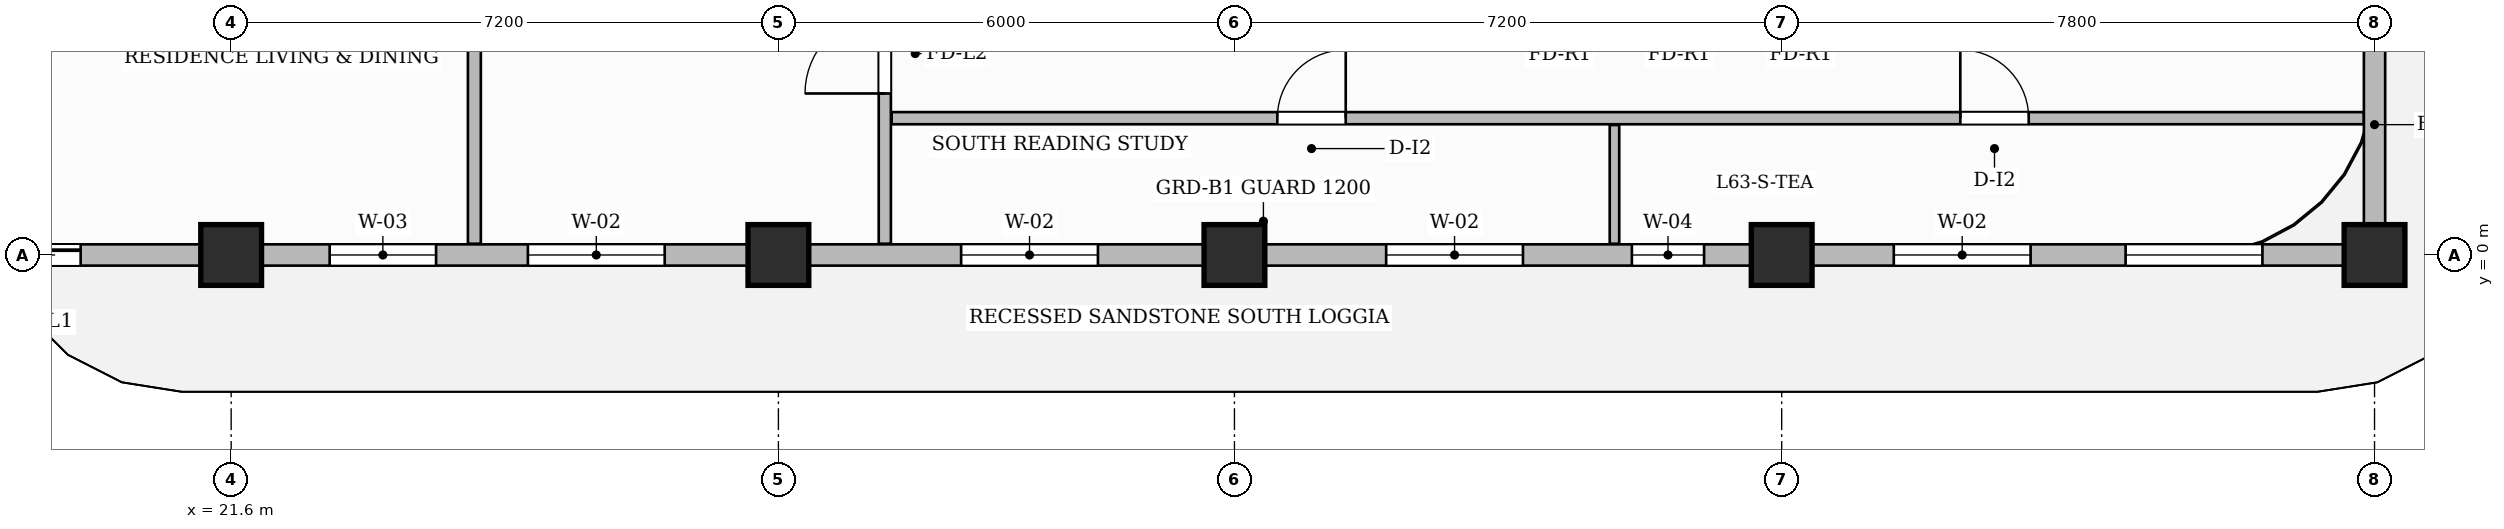
"""IFC4 building model, lengths in metres.
Left out: names, types, materials, properties, quantities, classifications, styles, units other than length and angle.
Written with IfcOpenShell. Run it as: python <this file> out.ifc"""

import sys

from ifc_helpers import new_model, si_unit, direction, frame, frame_2d, origin, origin_2d, place, context, subcontext, project, spatial, rectangle, extrude, source, transform, mapped, element, fill, save


model = new_model("IFC4")
c1 = context("Model", 3, precision=1e-05, world=origin(), true_north=direction((0.0, 1.0)))
c2 = subcontext(c1, "Body", "Model", "MODEL_VIEW")
j1 = project(units=[si_unit("LENGTHUNIT", "METRE"), si_unit("PLANEANGLEUNIT", "RADIAN")], contexts=[c1])
p1 = place(None, origin())
s1 = spatial("IfcSite", under=j1, at=p1, CompositionType="ELEMENT")
p2 = place(p1, origin())
s2 = spatial("IfcBuilding", under=s1, at=p2, CompositionType="ELEMENT")
p3 = place(p2, frame((0.0, 0.0, 251.95)))
s3 = spatial("IfcBuildingStorey", under=s2, at=p3, CompositionType="ELEMENT", Elevation=251.95)
m1 = source(origin(), c2, "Body", "SweptSolid", [
    extrude(rectangle(XDim=0.8, YDim=0.8, at=origin_2d()), origin(), (0.0, 0.0, 1.0), 3.85),
])
for number, where, z_axis, x_axis in (
    (1, (21.6, 0.0, 0.0), (0.0, 0.0, 1.0), (1.0, 0.0, 0.0)),
    (2, (28.8, 0.0, 0.0), (0.0, 0.0, 1.0), (1.0, 0.0, 0.0)),
    (3, (34.8, 0.0, 0.0), (0.0, 0.0, 1.0), (1.0, 0.0, 0.0)),
    (4, (42.0, 0.0, 0.0), (0.0, 0.0, 1.0), (1.0, 0.0, 0.0)),
    (5, (49.8, 0.0, 0.0), (0.0, 0.0, 1.0), (1.0, 0.0, 0.0)),
):
    element("IfcColumn", number, at=place(p3, frame(where, z_axis=z_axis, x_axis=x_axis)), inside=s3, PredefinedType="COLUMN", context=c2, shape_type="MappedRepresentation", body=[
        mapped(m1, transform((0.0, 0.0, 0.0), scale=1.0)),
    ])
p4 = place(p3, frame((30.2, 0.148, 0.0), z_axis=(0.0, 0.0, 1.0), x_axis=(0.0, 1.0, 0.0)))
e6 = element("IfcWall", 6, at=p4, inside=s3, PredefinedType="PARTITIONING", context=c2, shape_type="SweptSolid", body=[
    extrude(rectangle(XDim=9.912, YDim=0.16, at=frame_2d((4.956, 0.0))), origin(), (0.0, 0.0, 1.0), 3.6),
])
p5 = place(p4, frame((1.977, 0.0, 0.0)))
e7 = element("IfcOpeningElement", 7, at=p5, cuts=e6, PredefinedType="OPENING", context=c2, shape_type="SweptSolid", body=[
    extrude(rectangle(XDim=1.05, YDim=2.15, at=frame_2d((0.525, 1.075))), frame((0.0, 0.09, 0.0), z_axis=(0.0, -1.0, 0.0), x_axis=(1.0, 0.0, 0.0)), (0.0, 0.0, 1.0), 0.18),
])
p6 = place(p3, frame((30.29, 1.8, 0.0), z_axis=(0.0, 0.0, 1.0), x_axis=(1.0, 0.0, 0.0)))
e8 = element("IfcWall", 8, at=p6, inside=s3, PredefinedType="PARTITIONING", context=c2, shape_type="SweptSolid", body=[
    extrude(rectangle(XDim=19.37, YDim=0.16, at=frame_2d((9.685, 0.0))), origin(), (0.0, 0.0, 1.0), 3.6),
])
p7 = place(p6, frame((5.074, 0.0, 0.0)))
e9 = element("IfcOpeningElement", 9, at=p7, cuts=e8, PredefinedType="OPENING", context=c2, shape_type="SweptSolid", body=[
    extrude(rectangle(XDim=0.9, YDim=2.15, at=frame_2d((0.45, 1.075))), frame((0.0, 0.09, 0.0), z_axis=(0.0, -1.0, 0.0), x_axis=(1.0, 0.0, 0.0)), (0.0, 0.0, 1.0), 0.18),
])
p8 = place(p6, frame((14.06, 0.0, 0.0)))
e10 = element("IfcOpeningElement", 10, at=p8, cuts=e8, PredefinedType="OPENING", context=c2, shape_type="SweptSolid", body=[
    extrude(rectangle(XDim=0.9, YDim=2.15, at=frame_2d((0.45, 1.075))), frame((0.0, 0.09, 0.0), z_axis=(0.0, -1.0, 0.0), x_axis=(1.0, 0.0, 0.0)), (0.0, 0.0, 1.0), 0.18),
])
p9 = place(p3, frame((39.8, 0.148, 0.0), z_axis=(0.0, 0.0, 1.0), x_axis=(0.0, 1.0, 0.0)))
e11 = element("IfcWall", 11, at=p9, inside=s3, PredefinedType="PARTITIONING", context=c2, shape_type="SweptSolid", body=[
    extrude(rectangle(XDim=1.562, YDim=0.125, at=frame_2d((0.781, 0.0))), origin(), (0.0, 0.0, 1.0), 3.6),
])
p10 = place(p3, frame((24.8, 0.148, 0.0), z_axis=(0.0, 0.0, 1.0), x_axis=(0.0, 1.0, 0.0)))
e12 = element("IfcWall", 12, at=p10, inside=s3, PredefinedType="PARTITIONING", context=c2, shape_type="SweptSolid", body=[
    extrude(rectangle(XDim=9.912, YDim=0.17, at=frame_2d((4.956, 0.0))), origin(), (0.0, 0.0, 1.0), 3.6),
])
p11 = place(p10, frame((8.452, 0.0, 0.0)))
e13 = element("IfcOpeningElement", 13, at=p11, cuts=e12, PredefinedType="OPENING", context=c2, shape_type="SweptSolid", body=[
    extrude(rectangle(XDim=0.95, YDim=2.15, at=frame_2d((0.475, 1.075))), frame((0.0, 0.095, 0.0), z_axis=(0.0, -1.0, 0.0), x_axis=(1.0, 0.0, 0.0)), (0.0, 0.0, 1.0), 0.19),
])
p12 = place(p3, frame((18.0, 0.0, 0.0), z_axis=(0.0, 0.0, 1.0), x_axis=(1.0, 0.0, 0.0)))
e14 = element("IfcWall", 14, at=p12, inside=s3, PredefinedType="SOLIDWALL", context=c2, shape_type="SweptSolid", body=[
    extrude(rectangle(XDim=31.8, YDim=0.28, at=frame_2d((15.9, 0.0))), origin(), (0.0, 0.0, 1.0), 3.135),
])
p13 = place(p12, frame((0.42, 0.0, 0.0)))
e15 = element("IfcOpeningElement", 15, at=p13, cuts=e14, PredefinedType="OPENING", context=c2, shape_type="SweptSolid", body=[
    extrude(rectangle(XDim=1.2, YDim=2.2, at=frame_2d((0.6, 1.1))), frame((0.0, 0.15, 0.0), z_axis=(0.0, -1.0, 0.0), x_axis=(1.0, 0.0, 0.0)), (0.0, 0.0, 1.0), 0.3),
])
p14 = place(p12, frame((4.896, 0.0, 0.8)))
e16 = element("IfcOpeningElement", 16, at=p14, cuts=e14, PredefinedType="OPENING", context=c2, shape_type="SweptSolid", body=[
    extrude(rectangle(XDim=1.4, YDim=1.85, at=frame_2d((0.7, 0.925))), frame((0.0, 0.15, 0.0), z_axis=(0.0, -1.0, 0.0), x_axis=(1.0, 0.0, 0.0)), (0.0, 0.0, 1.0), 0.3),
])
p15 = place(p12, frame((7.504, 0.0, 0.8)))
e17 = element("IfcOpeningElement", 17, at=p15, cuts=e14, PredefinedType="OPENING", context=c2, shape_type="SweptSolid", body=[
    extrude(rectangle(XDim=1.8, YDim=1.85, at=frame_2d((0.9, 0.925))), frame((0.0, 0.15, 0.0), z_axis=(0.0, -1.0, 0.0), x_axis=(1.0, 0.0, 0.0)), (0.0, 0.0, 1.0), 0.3),
])
p16 = place(p12, frame((13.204, 0.0, 0.8)))
e18 = element("IfcOpeningElement", 18, at=p16, cuts=e14, PredefinedType="OPENING", context=c2, shape_type="SweptSolid", body=[
    extrude(rectangle(XDim=1.8, YDim=1.85, at=frame_2d((0.9, 0.925))), frame((0.0, 0.15, 0.0), z_axis=(0.0, -1.0, 0.0), x_axis=(1.0, 0.0, 0.0)), (0.0, 0.0, 1.0), 0.3),
])
p17 = place(p12, frame((18.796, 0.0, 0.8)))
e19 = element("IfcOpeningElement", 19, at=p17, cuts=e14, PredefinedType="OPENING", context=c2, shape_type="SweptSolid", body=[
    extrude(rectangle(XDim=1.8, YDim=1.85, at=frame_2d((0.9, 0.925))), frame((0.0, 0.15, 0.0), z_axis=(0.0, -1.0, 0.0), x_axis=(1.0, 0.0, 0.0)), (0.0, 0.0, 1.0), 0.3),
])
p18 = place(p12, frame((22.029, 0.0, 0.8)))
e20 = element("IfcOpeningElement", 20, at=p18, cuts=e14, PredefinedType="OPENING", context=c2, shape_type="SweptSolid", body=[
    extrude(rectangle(XDim=0.95, YDim=1.75, at=frame_2d((0.475, 0.875))), frame((0.0, 0.15, 0.0), z_axis=(0.0, -1.0, 0.0), x_axis=(1.0, 0.0, 0.0)), (0.0, 0.0, 1.0), 0.3),
])
p19 = place(p12, frame((25.475, 0.0, 0.8)))
e21 = element("IfcOpeningElement", 21, at=p19, cuts=e14, PredefinedType="OPENING", context=c2, shape_type="SweptSolid", body=[
    extrude(rectangle(XDim=1.8, YDim=1.85, at=frame_2d((0.9, 0.925))), frame((0.0, 0.15, 0.0), z_axis=(0.0, -1.0, 0.0), x_axis=(1.0, 0.0, 0.0)), (0.0, 0.0, 1.0), 0.3),
])
p20 = place(p12, frame((28.525, 0.0, 0.8)))
e22 = element("IfcOpeningElement", 22, at=p20, cuts=e14, PredefinedType="OPENING", context=c2, shape_type="SweptSolid", body=[
    extrude(rectangle(XDim=1.8, YDim=1.85, at=frame_2d((0.9, 0.925))), frame((0.0, 0.15, 0.0), z_axis=(0.0, -1.0, 0.0), x_axis=(1.0, 0.0, 0.0)), (0.0, 0.0, 1.0), 0.3),
])
p21 = place(p3, frame((49.8, 0.05, 0.0), z_axis=(0.0, 0.0, 1.0), x_axis=(0.0, 1.0, 0.0)))
e23 = element("IfcWall", 23, at=p21, inside=s3, PredefinedType="SOLIDWALL", context=c2, shape_type="SweptSolid", body=[
    extrude(rectangle(XDim=3.33, YDim=0.28, at=frame_2d((1.665, 0.0))), origin(), (0.0, 0.0, 1.0), 3.6),
])
m2 = source(origin(), c2, "Body", "SweptSolid", [
    extrude(rectangle(XDim=1.05, YDim=2.15, at=frame_2d((0.525, 1.075))), frame((0.0, 0.025, 0.0), z_axis=(0.0, -1.0, 0.0), x_axis=(1.0, 0.0, 0.0)), (0.0, 0.0, 1.0), 0.05),
])
p22 = place(p5, origin())
e24 = element("IfcDoor", 24, at=p22, inside=s3, OperationType="SINGLE_SWING_LEFT", PredefinedType="DOOR", context=c2, shape_type="MappedRepresentation", body=[
    mapped(m2, transform((0.0, 0.0, 0.0), scale=1.0)),
])
fill(e7, e24)
m3 = source(origin(), c2, "Body", "SweptSolid", [
    extrude(rectangle(XDim=0.9, YDim=2.15, at=frame_2d((0.45, 1.075))), frame((0.0, 0.025, 0.0), z_axis=(0.0, -1.0, 0.0), x_axis=(1.0, 0.0, 0.0)), (0.0, 0.0, 1.0), 0.05),
])
p23 = place(p7, origin())
e25 = element("IfcDoor", 25, at=p23, inside=s3, OperationType="SINGLE_SWING_RIGHT", PredefinedType="DOOR", context=c2, shape_type="MappedRepresentation", body=[
    mapped(m3, transform((0.0, 0.0, 0.0), scale=1.0)),
])
fill(e9, e25)
p24 = place(p8, origin())
e26 = element("IfcDoor", 26, at=p24, inside=s3, OperationType="SINGLE_SWING_LEFT", PredefinedType="DOOR", context=c2, shape_type="MappedRepresentation", body=[
    mapped(m3, transform((0.0, 0.0, 0.0), scale=1.0)),
])
fill(e10, e26)
m4 = source(origin(), c2, "Body", "SweptSolid", [
    extrude(rectangle(XDim=1.2, YDim=2.2, at=frame_2d((0.6, 1.1))), frame((0.0, 0.025, 0.0), z_axis=(0.0, -1.0, 0.0), x_axis=(1.0, 0.0, 0.0)), (0.0, 0.0, 1.0), 0.05),
])
p25 = place(p13, origin())
e27 = element("IfcDoor", 27, at=p25, inside=s3, OperationType="SLIDING_TO_LEFT", PredefinedType="DOOR", context=c2, shape_type="MappedRepresentation", body=[
    mapped(m4, transform((0.0, 0.0, 0.0), scale=1.0)),
])
fill(e15, e27)
m5 = source(origin(), c2, "Body", "SweptSolid", [
    extrude(rectangle(XDim=1.4, YDim=1.85, at=frame_2d((0.7, 0.925))), frame((0.0, 0.03, 0.0), z_axis=(0.0, -1.0, 0.0), x_axis=(1.0, 0.0, 0.0)), (0.0, 0.0, 1.0), 0.06),
])
p26 = place(p14, origin())
e28 = element("IfcWindow", 28, at=p26, inside=s3, PartitioningType="SINGLE_PANEL", PredefinedType="WINDOW", context=c2, shape_type="MappedRepresentation", body=[
    mapped(m5, transform((0.0, 0.0, 0.0), scale=1.0)),
])
fill(e16, e28)
m6 = source(origin(), c2, "Body", "SweptSolid", [
    extrude(rectangle(XDim=1.8, YDim=1.85, at=frame_2d((0.9, 0.925))), frame((0.0, 0.03, 0.0), z_axis=(0.0, -1.0, 0.0), x_axis=(1.0, 0.0, 0.0)), (0.0, 0.0, 1.0), 0.06),
])
p27 = place(p15, origin())
e29 = element("IfcWindow", 29, at=p27, inside=s3, PartitioningType="DOUBLE_PANEL_VERTICAL", PredefinedType="WINDOW", context=c2, shape_type="MappedRepresentation", body=[
    mapped(m6, transform((0.0, 0.0, 0.0), scale=1.0)),
])
fill(e17, e29)
p28 = place(p16, origin())
e30 = element("IfcWindow", 30, at=p28, inside=s3, PartitioningType="DOUBLE_PANEL_VERTICAL", PredefinedType="WINDOW", context=c2, shape_type="MappedRepresentation", body=[
    mapped(m6, transform((0.0, 0.0, 0.0), scale=1.0)),
])
fill(e18, e30)
p29 = place(p17, origin())
e31 = element("IfcWindow", 31, at=p29, inside=s3, PartitioningType="DOUBLE_PANEL_VERTICAL", PredefinedType="WINDOW", context=c2, shape_type="MappedRepresentation", body=[
    mapped(m6, transform((0.0, 0.0, 0.0), scale=1.0)),
])
fill(e19, e31)
m7 = source(origin(), c2, "Body", "SweptSolid", [
    extrude(rectangle(XDim=0.95, YDim=1.75, at=frame_2d((0.475, 0.875))), frame((0.0, 0.03, 0.0), z_axis=(0.0, -1.0, 0.0), x_axis=(1.0, 0.0, 0.0)), (0.0, 0.0, 1.0), 0.06),
])
p30 = place(p18, origin())
e32 = element("IfcWindow", 32, at=p30, inside=s3, PartitioningType="SINGLE_PANEL", PredefinedType="WINDOW", context=c2, shape_type="MappedRepresentation", body=[
    mapped(m7, transform((0.0, 0.0, 0.0), scale=1.0)),
])
fill(e20, e32)
p31 = place(p19, origin())
e33 = element("IfcWindow", 33, at=p31, inside=s3, PartitioningType="DOUBLE_PANEL_VERTICAL", PredefinedType="WINDOW", context=c2, shape_type="MappedRepresentation", body=[
    mapped(m6, transform((0.0, 0.0, 0.0), scale=1.0)),
])
fill(e21, e33)
p32 = place(p20, origin())
e34 = element("IfcWindow", 34, at=p32, inside=s3, PartitioningType="DOUBLE_PANEL_VERTICAL", PredefinedType="WINDOW", context=c2, shape_type="MappedRepresentation", body=[
    mapped(m6, transform((0.0, 0.0, 0.0), scale=1.0)),
])
fill(e22, e34)
save(model, sys.argv[1])
